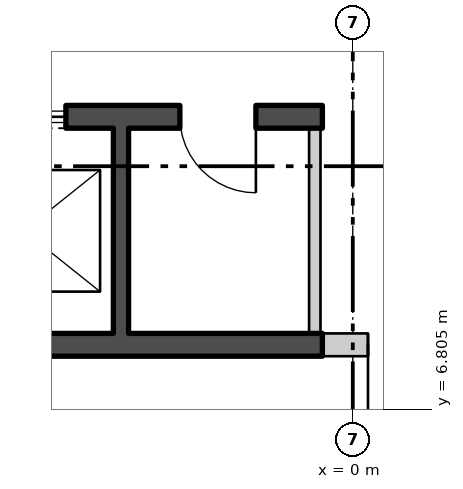
"""IFC4 building model, lengths in metres.
Left out: names, types, materials, properties, quantities, classifications, styles, units other than length and angle.
Written with IfcOpenShell. Run it as: python <this file> out.ifc"""

import sys

from ifc_helpers import new_model, si_unit, direction, frame, frame_2d, origin, place, context, subcontext, project, spatial, polyline, rectangle, outline, extrude, element, fill, save


model = new_model("IFC4")
c1 = context("Model", 3, precision=1e-05, world=origin(), true_north=direction((0.0, 1.0)))
c2 = subcontext(c1, "Body", "Model", "MODEL_VIEW")
j1 = project(units=[si_unit("LENGTHUNIT", "METRE"), si_unit("PLANEANGLEUNIT", "RADIAN")], contexts=[c1])
p1 = place(None, origin())
s1 = spatial("IfcSite", under=j1, at=p1, CompositionType="ELEMENT")
p2 = place(p1, origin())
s2 = spatial("IfcBuilding", under=s1, at=p2, CompositionType="ELEMENT")
p3 = place(p2, frame((0.0, 0.0, 186.6)))
s3 = spatial("IfcBuildingStorey", under=s2, at=p3, CompositionType="ELEMENT", Elevation=186.6)
p4 = place(p3, frame((-26.67, 13.393, -0.18), z_axis=(0.0, 0.0, 1.0), x_axis=(0.500000711659, -0.866024992908, 0.0)))
e1 = element("IfcWall", 1, at=p4, inside=s3, PredefinedType="SOLIDWALL", context=c2, shape_type="SweptSolid", body=[
    extrude(outline(polyline([(-0.13, -0.225), (45.87, -0.225), (45.61, 0.225), (0.13, 0.225), (-0.13, -0.225)])), origin(), (0.0, 0.0, 1.0), 6.0),
])
p5 = place(p4, frame((1.424, 0.0, 1.38)))
e2 = element("IfcOpeningElement", 2, at=p5, cuts=e1, PredefinedType="OPENING", context=c2, shape_type="SweptSolid", body=[
    extrude(rectangle(XDim=2.4, YDim=3.6, at=frame_2d((1.2, 1.8))), frame((0.0, 0.235, 0.0), z_axis=(0.0, -1.0, 0.0), x_axis=(1.0, 0.0, 0.0)), (0.0, 0.0, 1.0), 0.47),
])
p6 = place(p4, frame((5.893, 0.0, 1.38)))
e3 = element("IfcOpeningElement", 3, at=p6, cuts=e1, PredefinedType="OPENING", context=c2, shape_type="SweptSolid", body=[
    extrude(rectangle(XDim=2.4, YDim=3.6, at=frame_2d((1.2, 1.8))), frame((0.0, 0.235, 0.0), z_axis=(0.0, -1.0, 0.0), x_axis=(1.0, 0.0, 0.0)), (0.0, 0.0, 1.0), 0.47),
])
p7 = place(p4, frame((10.401, 0.0, 1.38)))
e4 = element("IfcOpeningElement", 4, at=p7, cuts=e1, PredefinedType="OPENING", context=c2, shape_type="SweptSolid", body=[
    extrude(rectangle(XDim=2.4, YDim=3.6, at=frame_2d((1.2, 1.8))), frame((0.0, 0.235, 0.0), z_axis=(0.0, -1.0, 0.0), x_axis=(1.0, 0.0, 0.0)), (0.0, 0.0, 1.0), 0.47),
])
p8 = place(p4, frame((14.909, 0.0, 1.38)))
e5 = element("IfcOpeningElement", 5, at=p8, cuts=e1, PredefinedType="OPENING", context=c2, shape_type="SweptSolid", body=[
    extrude(rectangle(XDim=2.4, YDim=3.6, at=frame_2d((1.2, 1.8))), frame((0.0, 0.235, 0.0), z_axis=(0.0, -1.0, 0.0), x_axis=(1.0, 0.0, 0.0)), (0.0, 0.0, 1.0), 0.47),
])
p9 = place(p4, frame((19.416, 0.0, 1.38)))
e6 = element("IfcOpeningElement", 6, at=p9, cuts=e1, PredefinedType="OPENING", context=c2, shape_type="SweptSolid", body=[
    extrude(rectangle(XDim=2.4, YDim=3.6, at=frame_2d((1.2, 1.8))), frame((0.0, 0.235, 0.0), z_axis=(0.0, -1.0, 0.0), x_axis=(1.0, 0.0, 0.0)), (0.0, 0.0, 1.0), 0.47),
])
p10 = place(p4, frame((23.924, 0.0, 1.38)))
e7 = element("IfcOpeningElement", 7, at=p10, cuts=e1, PredefinedType="OPENING", context=c2, shape_type="SweptSolid", body=[
    extrude(rectangle(XDim=2.4, YDim=3.6, at=frame_2d((1.2, 1.8))), frame((0.0, 0.235, 0.0), z_axis=(0.0, -1.0, 0.0), x_axis=(1.0, 0.0, 0.0)), (0.0, 0.0, 1.0), 0.47),
])
p11 = place(p4, frame((28.431, 0.0, 1.38)))
e8 = element("IfcOpeningElement", 8, at=p11, cuts=e1, PredefinedType="OPENING", context=c2, shape_type="SweptSolid", body=[
    extrude(rectangle(XDim=2.4, YDim=3.6, at=frame_2d((1.2, 1.8))), frame((0.0, 0.235, 0.0), z_axis=(0.0, -1.0, 0.0), x_axis=(1.0, 0.0, 0.0)), (0.0, 0.0, 1.0), 0.47),
])
p12 = place(p4, frame((32.939, 0.0, 1.38)))
e9 = element("IfcOpeningElement", 9, at=p12, cuts=e1, PredefinedType="OPENING", context=c2, shape_type="SweptSolid", body=[
    extrude(rectangle(XDim=2.4, YDim=3.6, at=frame_2d((1.2, 1.8))), frame((0.0, 0.235, 0.0), z_axis=(0.0, -1.0, 0.0), x_axis=(1.0, 0.0, 0.0)), (0.0, 0.0, 1.0), 0.47),
])
p13 = place(p4, frame((37.447, 0.0, 1.38)))
e10 = element("IfcOpeningElement", 10, at=p13, cuts=e1, PredefinedType="OPENING", context=c2, shape_type="SweptSolid", body=[
    extrude(rectangle(XDim=2.4, YDim=3.6, at=frame_2d((1.2, 1.8))), frame((0.0, 0.235, 0.0), z_axis=(0.0, -1.0, 0.0), x_axis=(1.0, 0.0, 0.0)), (0.0, 0.0, 1.0), 0.47),
])
p14 = place(p4, frame((41.916, 0.0, 1.38)))
e11 = element("IfcOpeningElement", 11, at=p14, cuts=e1, PredefinedType="OPENING", context=c2, shape_type="SweptSolid", body=[
    extrude(rectangle(XDim=2.4, YDim=3.6, at=frame_2d((1.2, 1.8))), frame((0.0, 0.235, 0.0), z_axis=(0.0, -1.0, 0.0), x_axis=(1.0, 0.0, 0.0)), (0.0, 0.0, 1.0), 0.47),
])
p15 = place(p3, frame((-10.7, 10.65, 0.0), z_axis=(0.0, 0.0, 1.0), x_axis=(1.0, 0.0, 0.0)))
e12 = element("IfcWall", 12, at=p15, inside=s3, PredefinedType="SHEAR", context=c2, shape_type="SweptSolid", body=[
    extrude(rectangle(XDim=10.3, YDim=0.3, at=frame_2d((5.15, 0.0))), origin(), (0.0, 0.0, 1.0), 5.8),
])
p16 = place(p15, frame((0.675, 0.0, 0.0)))
e13 = element("IfcOpeningElement", 13, at=p16, cuts=e12, PredefinedType="OPENING", context=c2, shape_type="SweptSolid", body=[
    extrude(rectangle(XDim=1.1, YDim=2.1, at=frame_2d((0.55, 1.05))), frame((0.0, 0.16, 0.0), z_axis=(0.0, -1.0, 0.0), x_axis=(1.0, 0.0, 0.0)), (0.0, 0.0, 1.0), 0.32),
])
p17 = place(p15, frame((3.275, 0.0, 0.0)))
e14 = element("IfcOpeningElement", 14, at=p17, cuts=e12, PredefinedType="OPENING", context=c2, shape_type="SweptSolid", body=[
    extrude(rectangle(XDim=1.1, YDim=2.1, at=frame_2d((0.55, 1.05))), frame((0.0, 0.16, 0.0), z_axis=(0.0, -1.0, 0.0), x_axis=(1.0, 0.0, 0.0)), (0.0, 0.0, 1.0), 0.32),
])
p18 = place(p15, frame((5.825, 0.0, 0.0)))
e15 = element("IfcOpeningElement", 15, at=p18, cuts=e12, PredefinedType="OPENING", context=c2, shape_type="SweptSolid", body=[
    extrude(rectangle(XDim=1.1, YDim=2.1, at=frame_2d((0.55, 1.05))), frame((0.0, 0.16, 0.0), z_axis=(0.0, -1.0, 0.0), x_axis=(1.0, 0.0, 0.0)), (0.0, 0.0, 1.0), 0.32),
])
p19 = place(p15, frame((8.425, 0.0, 0.0)))
e16 = element("IfcOpeningElement", 16, at=p19, cuts=e12, PredefinedType="OPENING", context=c2, shape_type="SweptSolid", body=[
    extrude(rectangle(XDim=1.0, YDim=2.1, at=frame_2d((0.5, 1.05))), frame((0.0, 0.16, 0.0), z_axis=(0.0, -1.0, 0.0), x_axis=(1.0, 0.0, 0.0)), (0.0, 0.0, 1.0), 0.32),
])
p20 = place(p3, frame((-10.7, 7.65, 0.0), z_axis=(0.0, 0.0, 1.0), x_axis=(1.0, 0.0, 0.0)))
e17 = element("IfcWall", 17, at=p20, inside=s3, PredefinedType="SHEAR", context=c2, shape_type="SweptSolid", body=[
    extrude(rectangle(XDim=10.3, YDim=0.3, at=frame_2d((5.15, 0.0))), origin(), (0.0, 0.0, 1.0), 5.8),
])
p21 = place(p3, frame((-3.05, 7.8, 0.0), z_axis=(0.0, 0.0, 1.0), x_axis=(0.0, 1.0, 0.0)))
e18 = element("IfcWall", 18, at=p21, inside=s3, PredefinedType="SHEAR", context=c2, shape_type="SweptSolid", body=[
    extrude(rectangle(XDim=2.7, YDim=0.2, at=frame_2d((1.35, 0.0))), origin(), (0.0, 0.0, 1.0), 5.8),
])
p22 = place(p3, frame((-0.5, 7.8, 0.0), z_axis=(0.0, 0.0, 1.0), x_axis=(0.0, 1.0, 0.0)))
e19 = element("IfcWall", 19, at=p22, inside=s3, PredefinedType="PARTITIONING", context=c2, shape_type="SweptSolid", body=[
    extrude(rectangle(XDim=2.7, YDim=0.15, at=frame_2d((1.35, 0.0))), origin(), (0.0, 0.0, 1.0), 5.8),
])
p23 = place(p3, frame((-0.4, 7.65, 0.0), z_axis=(0.0, 0.0, 1.0), x_axis=(1.0, 0.0, 0.0)))
e20 = element("IfcWall", 20, at=p23, inside=s3, PredefinedType="PARTITIONING", context=c2, shape_type="SweptSolid", body=[
    extrude(rectangle(XDim=3.0, YDim=0.3, at=frame_2d((1.5, 0.0))), origin(), (0.0, 0.0, 1.0), 5.8),
])
p24 = place(p23, frame((0.6, 0.0, 0.0)))
e21 = element("IfcOpeningElement", 21, at=p24, cuts=e20, PredefinedType="OPENING", context=c2, shape_type="SweptSolid", body=[
    extrude(rectangle(XDim=1.8, YDim=2.4, at=frame_2d((0.9, 1.2))), frame((0.0, 0.16, 0.0), z_axis=(0.0, -1.0, 0.0), x_axis=(1.0, 0.0, 0.0)), (0.0, 0.0, 1.0), 0.32),
])
p25 = place(p18, origin())
e22 = element("IfcDoor", 22, at=p25, inside=s3, OperationType="SLIDING_TO_LEFT", PredefinedType="DOOR", context=c2, shape_type="SweptSolid", body=[
    extrude(rectangle(XDim=1.1, YDim=2.1, at=frame_2d((0.55, 1.05))), frame((0.0, 0.025, 0.0), z_axis=(0.0, -1.0, 0.0), x_axis=(1.0, 0.0, 0.0)), (0.0, 0.0, 1.0), 0.05),
])
fill(e15, e22)
p26 = place(p19, origin())
e23 = element("IfcDoor", 23, at=p26, inside=s3, OperationType="SINGLE_SWING_RIGHT", PredefinedType="DOOR", context=c2, shape_type="SweptSolid", body=[
    extrude(rectangle(XDim=1.0, YDim=2.1, at=frame_2d((0.5, 1.05))), frame((0.0, 0.025, 0.0), z_axis=(0.0, -1.0, 0.0), x_axis=(1.0, 0.0, 0.0)), (0.0, 0.0, 1.0), 0.05),
])
fill(e16, e23)
p27 = place(p24, origin())
e24 = element("IfcDoor", 24, at=p27, inside=s3, OperationType="DOUBLE_DOOR_SINGLE_SWING", PredefinedType="DOOR", context=c2, shape_type="SweptSolid", body=[
    extrude(rectangle(XDim=1.8, YDim=2.4, at=frame_2d((0.9, 1.2))), frame((0.0, 0.025, 0.0), z_axis=(0.0, -1.0, 0.0), x_axis=(1.0, 0.0, 0.0)), (0.0, 0.0, 1.0), 0.05),
])
fill(e21, e24)
save(model, sys.argv[1])
